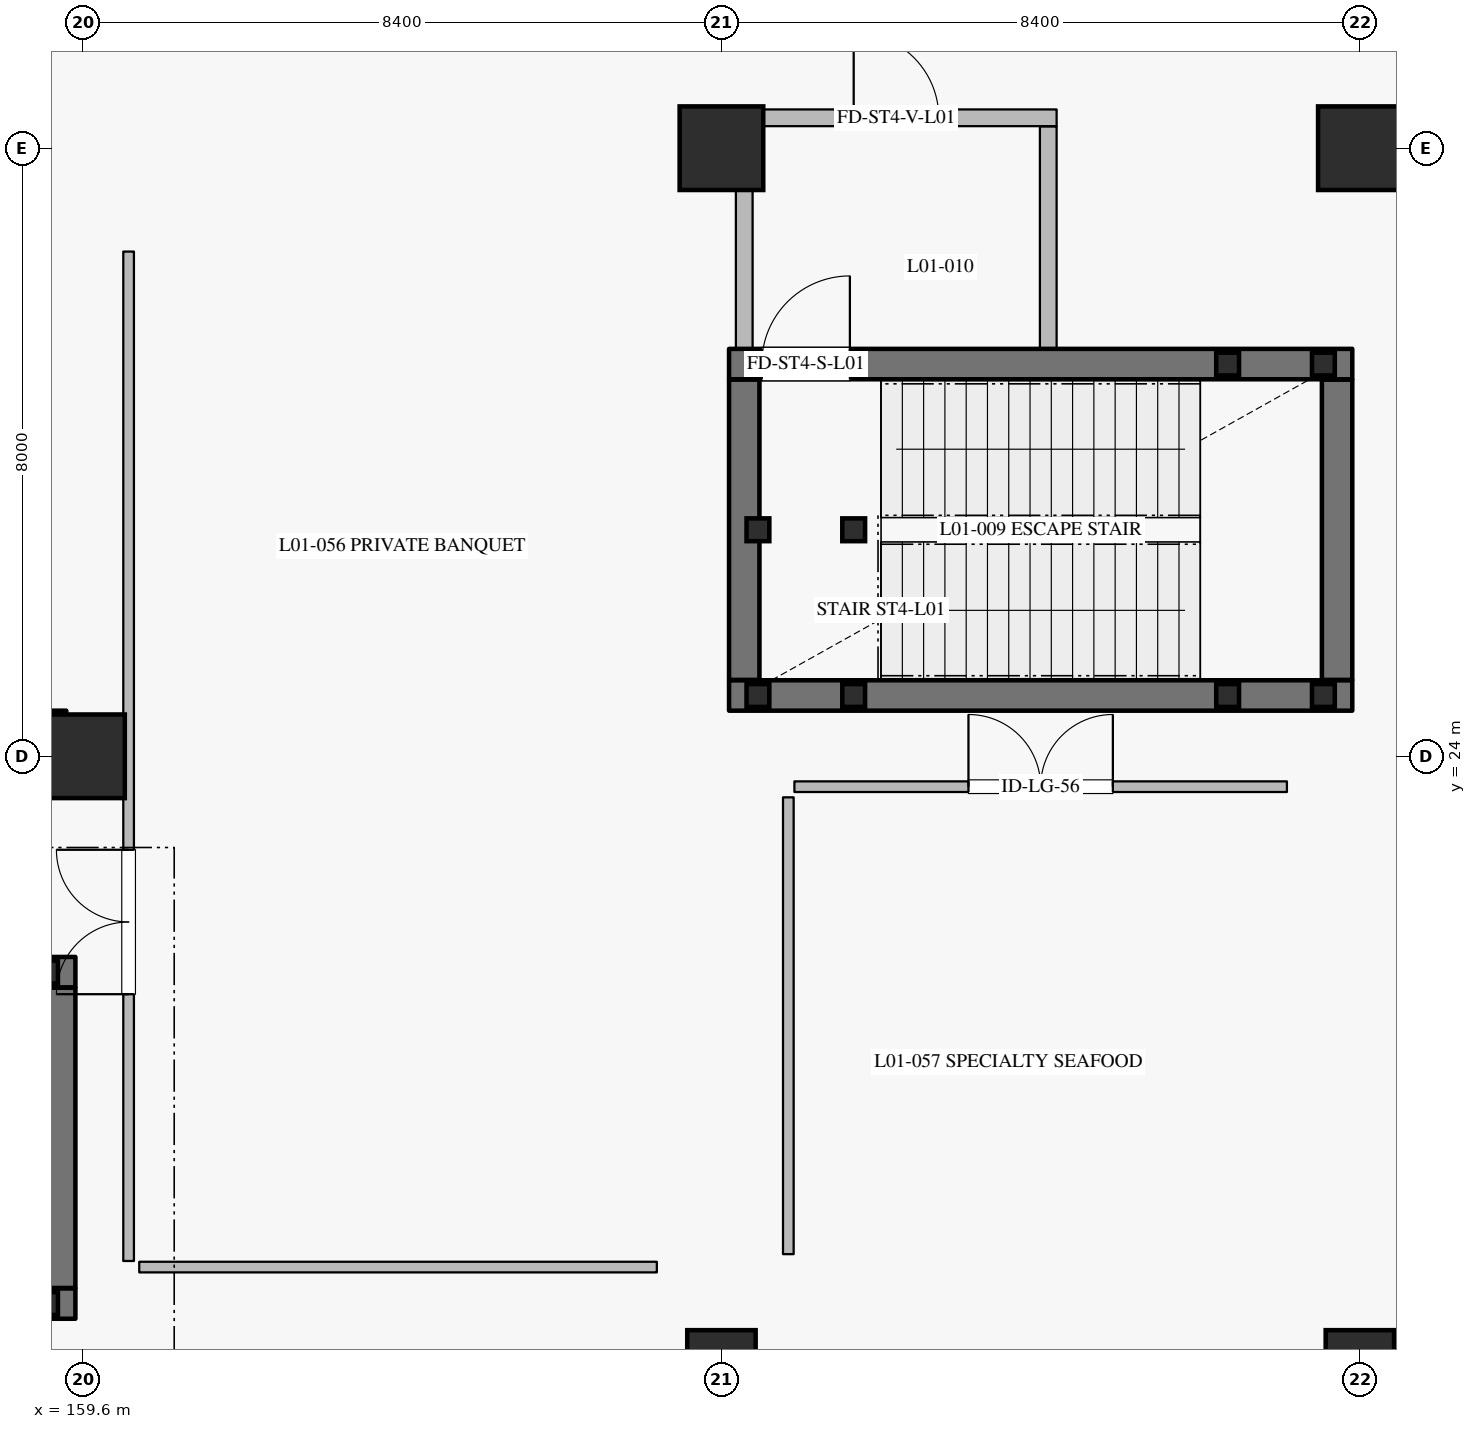
"""IFC4 building model, lengths in metres.
Left out: names, types, materials, properties, quantities, classifications, styles, units other than length and angle.
Written with IfcOpenShell. Run it as: python <this file> out.ifc"""

import sys

from ifc_helpers import new_model, si_unit, direction, frame, frame_2d, origin, origin_2d, place, context, subcontext, project, spatial, rectangle, hollow_rectangle, circle, extrude, element, fill, save


model = new_model("IFC4")
c1 = context("Model", 3, precision=1e-05, world=origin(), true_north=direction((0.0, 1.0)))
c2 = subcontext(c1, "Body", "Model", "MODEL_VIEW")
j1 = project(units=[si_unit("LENGTHUNIT", "METRE"), si_unit("PLANEANGLEUNIT", "RADIAN")], contexts=[c1])
p1 = place(None, origin())
s1 = spatial("IfcSite", under=j1, at=p1, CompositionType="ELEMENT")
p2 = place(p1, origin())
s2 = spatial("IfcBuilding", under=s1, at=p2, CompositionType="ELEMENT")
p3 = place(p2, frame((0.0, 0.0, 6.0)))
s3 = spatial("IfcBuildingStorey", under=s2, at=p3, CompositionType="ELEMENT", Elevation=6.0)
p4 = place(p3, frame((159.6, 24.0, 0.0), z_axis=(0.0, 0.0, 1.0), x_axis=(1.0, 0.0, 0.0)))
e1 = element("IfcColumn", 1, at=p4, inside=s3, PredefinedType="COLUMN", context=c2, shape_type="SweptSolid", body=[
    extrude(circle(Radius=0.55, at=origin_2d()), origin(), (0.0, 0.0, 1.0), 5.4),
])
p5 = place(p3, frame((168.0, 16.0, 0.0), z_axis=(0.0, 0.0, 1.0), x_axis=(1.0, 0.0, 0.0)))
e2 = element("IfcColumn", 2, at=p5, inside=s3, PredefinedType="COLUMN", context=c2, shape_type="SweptSolid", body=[
    extrude(circle(Radius=0.45, at=origin_2d()), origin(), (0.0, 0.0, 1.0), 5.4),
])
p6 = place(p3, frame((168.0, 32.0, 0.0), z_axis=(0.0, 0.0, 1.0), x_axis=(1.0, 0.0, 0.0)))
e3 = element("IfcColumn", 3, at=p6, inside=s3, PredefinedType="COLUMN", context=c2, shape_type="SweptSolid", body=[
    extrude(circle(Radius=0.55, at=origin_2d()), origin(), (0.0, 0.0, 1.0), 5.4),
])
p7 = place(p3, frame((176.4, 16.0, 0.0), z_axis=(0.0, 0.0, 1.0), x_axis=(1.0, 0.0, 0.0)))
e4 = element("IfcColumn", 4, at=p7, inside=s3, PredefinedType="COLUMN", context=c2, shape_type="SweptSolid", body=[
    extrude(circle(Radius=0.45, at=origin_2d()), origin(), (0.0, 0.0, 1.0), 5.4),
])
p8 = place(p3, frame((176.4, 32.0, 0.0), z_axis=(0.0, 0.0, 1.0), x_axis=(1.0, 0.0, 0.0)))
e5 = element("IfcColumn", 5, at=p8, inside=s3, PredefinedType="COLUMN", context=c2, shape_type="SweptSolid", body=[
    extrude(circle(Radius=0.55, at=origin_2d()), origin(), (0.0, 0.0, 1.0), 5.4),
])
p9 = place(p3, frame((159.38, 24.45, 0.0), z_axis=(0.0, 0.0, 1.0), x_axis=(-1.0, 0.0, 0.0)))
e6 = element("IfcWall", 6, at=p9, inside=s3, PredefinedType="SHEAR", context=c2, shape_type="SweptSolid", body=[
    extrude(rectangle(XDim=4.13, YDim=0.3, at=frame_2d((2.065, 0.0))), origin(), (0.0, 0.0, 1.0), 5.045),
])
p10 = place(p9, frame((1.755, 0.0, 0.0)))
e7 = element("IfcOpeningElement", 7, at=p10, cuts=e6, PredefinedType="OPENING", context=c2, shape_type="SweptSolid", body=[
    extrude(rectangle(XDim=1.25, YDim=2.25, at=frame_2d((0.625, 1.125))), frame((0.0, 0.16, 0.0), z_axis=(0.0, -1.0, 0.0), x_axis=(1.0, 0.0, 0.0)), (0.0, 0.0, 1.0), 0.32),
])
p11 = place(p3, frame((151.3, 16.8, 0.0), z_axis=(0.0, 0.0, 1.0), x_axis=(1.0, 0.0, 0.0)))
e8 = element("IfcWall", 8, at=p11, inside=s3, PredefinedType="SHEAR", context=c2, shape_type="SweptSolid", body=[
    extrude(rectangle(XDim=8.2, YDim=0.4, at=frame_2d((4.1, 0.0))), origin(), (0.0, 0.0, 1.0), 5.045),
])
p12 = place(p3, frame((159.3, 17.005, 0.0), z_axis=(0.0, 0.0, 1.0), x_axis=(0.0, 1.0, 0.0)))
e9 = element("IfcWall", 9, at=p12, inside=s3, PredefinedType="SHEAR", context=c2, shape_type="SweptSolid", body=[
    extrude(rectangle(XDim=3.95, YDim=0.4, at=frame_2d((1.975, 0.0))), origin(), (0.0, 0.0, 1.0), 5.045),
])
p13 = place(p3, frame((151.3, 21.16, 0.0), z_axis=(0.0, 0.0, 1.0), x_axis=(1.0, 0.0, 0.0)))
e10 = element("IfcWall", 10, at=p13, inside=s3, PredefinedType="SHEAR", context=c2, shape_type="SweptSolid", body=[
    extrude(rectangle(XDim=8.2, YDim=0.4, at=frame_2d((4.1, 0.0))), origin(), (0.0, 0.0, 1.0), 5.045),
])
p14 = place(p13, frame((0.43, 0.0, 0.0)))
e11 = element("IfcOpeningElement", 11, at=p14, cuts=e10, PredefinedType="OPENING", context=c2, shape_type="SweptSolid", body=[
    extrude(rectangle(XDim=1.16, YDim=2.2, at=frame_2d((0.58, 1.1))), frame((0.0, 0.21, 0.0), z_axis=(0.0, -1.0, 0.0), x_axis=(1.0, 0.0, 0.0)), (0.0, 0.0, 1.0), 0.42),
])
for number, where, z_axis, x_axis in (
    (12, (159.12, 16.8, -3.0), (0.0, 0.0, 1.0), (1.0, 0.0, 0.0)),
    (13, (159.12, 21.16, -3.0), (0.0, 0.0, 1.0), (1.0, 0.0, 0.0)),
):
    element("IfcColumn", number, at=place(p3, frame(where, z_axis=z_axis, x_axis=x_axis)), inside=s3, PredefinedType="COLUMN", context=c2, shape_type="SweptSolid", body=[
        extrude(hollow_rectangle(XDim=0.3, YDim=0.3, WallThickness=0.012, at=origin_2d()), origin(), (0.0, 0.0, 1.0), 5.52),
    ])
p15 = place(p3, frame((168.1, 24.8, 0.0), z_axis=(0.0, 0.0, 1.0), x_axis=(1.0, 0.0, 0.0)))
e14 = element("IfcWall", 14, at=p15, inside=s3, PredefinedType="SHEAR", context=c2, shape_type="SweptSolid", body=[
    extrude(rectangle(XDim=8.2, YDim=0.4, at=frame_2d((4.1, 0.0))), origin(), (0.0, 0.0, 1.0), 5.045),
])
p16 = place(p3, frame((176.1, 25.005, 0.0), z_axis=(0.0, 0.0, 1.0), x_axis=(0.0, 1.0, 0.0)))
e15 = element("IfcWall", 15, at=p16, inside=s3, PredefinedType="SHEAR", context=c2, shape_type="SweptSolid", body=[
    extrude(rectangle(XDim=3.95, YDim=0.4, at=frame_2d((1.975, 0.0))), origin(), (0.0, 0.0, 1.0), 5.045),
])
p17 = place(p3, frame((168.1, 29.16, 0.0), z_axis=(0.0, 0.0, 1.0), x_axis=(1.0, 0.0, 0.0)))
e16 = element("IfcWall", 16, at=p17, inside=s3, PredefinedType="SHEAR", context=c2, shape_type="SweptSolid", body=[
    extrude(rectangle(XDim=8.2, YDim=0.4, at=frame_2d((4.1, 0.0))), origin(), (0.0, 0.0, 1.0), 5.045),
])
p18 = place(p17, frame((0.43, 0.0, 0.0)))
e17 = element("IfcOpeningElement", 17, at=p18, cuts=e16, PredefinedType="OPENING", context=c2, shape_type="SweptSolid", body=[
    extrude(rectangle(XDim=1.16, YDim=2.2, at=frame_2d((0.58, 1.1))), frame((0.0, 0.21, 0.0), z_axis=(0.0, -1.0, 0.0), x_axis=(1.0, 0.0, 0.0)), (0.0, 0.0, 1.0), 0.42),
])
p19 = place(p3, frame((168.3, 25.005, 0.0), z_axis=(0.0, 0.0, 1.0), x_axis=(0.0, 1.0, 0.0)))
e18 = element("IfcWall", 18, at=p19, inside=s3, PredefinedType="SHEAR", context=c2, shape_type="SweptSolid", body=[
    extrude(rectangle(XDim=3.95, YDim=0.4, at=frame_2d((1.975, 0.0))), origin(), (0.0, 0.0, 1.0), 5.045),
])
p20 = place(p3, frame((168.3, 29.365, 0.0), z_axis=(0.0, 0.0, 1.0), x_axis=(0.0, 1.0, 0.0)))
e19 = element("IfcWall", 19, at=p20, inside=s3, PredefinedType="PARTITIONING", context=c2, shape_type="SweptSolid", body=[
    extrude(rectangle(XDim=2.92, YDim=0.22, at=frame_2d((1.46, 0.0))), origin(), (0.0, 0.0, 1.0), 3.45),
])
p21 = place(p3, frame((168.19, 32.4, 0.0), z_axis=(0.0, 0.0, 1.0), x_axis=(1.0, 0.0, 0.0)))
e20 = element("IfcWall", 20, at=p21, inside=s3, PredefinedType="PARTITIONING", context=c2, shape_type="SweptSolid", body=[
    extrude(rectangle(XDim=4.22, YDim=0.22, at=frame_2d((2.11, 0.0))), origin(), (0.0, 0.0, 1.0), 5.045),
])
p22 = place(p21, frame((1.55, 0.0, 0.0)))
e21 = element("IfcOpeningElement", 21, at=p22, cuts=e20, PredefinedType="OPENING", context=c2, shape_type="SweptSolid", body=[
    extrude(rectangle(XDim=1.12, YDim=2.2, at=frame_2d((0.56, 1.1))), frame((0.0, 0.12, 0.0), z_axis=(0.0, -1.0, 0.0), x_axis=(1.0, 0.0, 0.0)), (0.0, 0.0, 1.0), 0.24),
])
p23 = place(p3, frame((172.3, 29.365, 0.0), z_axis=(0.0, 0.0, 1.0), x_axis=(0.0, 1.0, 0.0)))
e22 = element("IfcWall", 22, at=p23, inside=s3, PredefinedType="PARTITIONING", context=c2, shape_type="SweptSolid", body=[
    extrude(rectangle(XDim=2.92, YDim=0.22, at=frame_2d((1.46, 0.0))), origin(), (0.0, 0.0, 1.0), 5.045),
])
for number, where, z_axis, x_axis in (
    (23, (168.48, 24.8, 0.0), (0.0, 0.0, 1.0), (1.0, 0.0, 0.0)),
    (24, (168.48, 26.98, 0.0), (0.0, 0.0, 1.0), (1.0, 0.0, 0.0)),
    (25, (169.74, 24.8, 0.0), (0.0, 0.0, 1.0), (1.0, 0.0, 0.0)),
    (26, (169.74, 26.98, 0.0), (0.0, 0.0, 1.0), (1.0, 0.0, 0.0)),
):
    element("IfcColumn", number, at=place(p3, frame(where, z_axis=z_axis, x_axis=x_axis)), inside=s3, PredefinedType="COLUMN", context=c2, shape_type="SweptSolid", body=[
        extrude(hollow_rectangle(XDim=0.3, YDim=0.3, WallThickness=0.012, at=origin_2d()), origin(), (0.0, 0.0, 1.0), 5.22),
    ])
for number, where, z_axis, x_axis in (
    (27, (174.66, 24.8, -3.0), (0.0, 0.0, 1.0), (1.0, 0.0, 0.0)),
    (28, (174.66, 29.16, -3.0), (0.0, 0.0, 1.0), (1.0, 0.0, 0.0)),
    (29, (175.92, 24.8, -3.0), (0.0, 0.0, 1.0), (1.0, 0.0, 0.0)),
    (30, (175.92, 29.16, -3.0), (0.0, 0.0, 1.0), (1.0, 0.0, 0.0)),
):
    element("IfcColumn", number, at=place(p3, frame(where, z_axis=z_axis, x_axis=x_axis)), inside=s3, PredefinedType="COLUMN", context=c2, shape_type="SweptSolid", body=[
        extrude(hollow_rectangle(XDim=0.3, YDim=0.3, WallThickness=0.012, at=origin_2d()), origin(), (0.0, 0.0, 1.0), 5.52),
    ])
p24 = place(p3, frame((160.2, 17.36, 0.0), z_axis=(0.0, 0.0, 1.0), x_axis=(0.0, 1.0, 0.0)))
e31 = element("IfcWall", 31, at=p24, inside=s3, PredefinedType="PARTITIONING", context=c2, shape_type="SweptSolid", body=[
    extrude(rectangle(XDim=13.28, YDim=0.14, at=frame_2d((6.64, 0.0))), origin(), (0.0, 0.0, 1.0), 5.045),
])
p25 = place(p24, frame((3.51, 0.0, 0.0)))
e32 = element("IfcOpeningElement", 32, at=p25, cuts=e31, PredefinedType="OPENING", context=c2, shape_type="SweptSolid", body=[
    extrude(rectangle(XDim=1.9, YDim=2.4, at=frame_2d((0.95, 1.2))), frame((0.0, 0.08, 0.0), z_axis=(0.0, -1.0, 0.0), x_axis=(1.0, 0.0, 0.0)), (0.0, 0.0, 1.0), 0.16),
])
p26 = place(p3, frame((160.34, 17.28, 0.0), z_axis=(0.0, 0.0, 1.0), x_axis=(1.0, 0.0, 0.0)))
e33 = element("IfcWall", 33, at=p26, inside=s3, PredefinedType="PARTITIONING", context=c2, shape_type="SweptSolid", body=[
    extrude(rectangle(XDim=6.81, YDim=0.14, at=frame_2d((3.405, 0.0))), origin(), (0.0, 0.0, 1.0), 5.045),
])
p27 = place(p3, frame((168.96, 23.6, 0.0), z_axis=(0.0, 0.0, 1.0), x_axis=(1.0, 0.0, 0.0)))
e34 = element("IfcWall", 34, at=p27, inside=s3, PredefinedType="PARTITIONING", context=c2, shape_type="SweptSolid", body=[
    extrude(rectangle(XDim=6.48, YDim=0.14, at=frame_2d((3.24, 0.0))), origin(), (0.0, 0.0, 1.0), 5.045),
])
p28 = place(p27, frame((2.29, 0.0, 0.0)))
e35 = element("IfcOpeningElement", 35, at=p28, cuts=e34, PredefinedType="OPENING", context=c2, shape_type="SweptSolid", body=[
    extrude(rectangle(XDim=1.9, YDim=2.4, at=frame_2d((0.95, 1.2))), frame((0.0, 0.08, 0.0), z_axis=(0.0, -1.0, 0.0), x_axis=(1.0, 0.0, 0.0)), (0.0, 0.0, 1.0), 0.16),
])
p29 = place(p3, frame((168.88, 17.45, 0.0), z_axis=(0.0, 0.0, 1.0), x_axis=(0.0, 1.0, 0.0)))
e36 = element("IfcWall", 36, at=p29, inside=s3, PredefinedType="PARTITIONING", context=c2, shape_type="SweptSolid", body=[
    extrude(rectangle(XDim=6.01, YDim=0.14, at=frame_2d((3.005, 0.0))), origin(), (0.0, 0.0, 1.0), 5.045),
])
p30 = place(p18, origin())
e37 = element("IfcDoor", 37, at=p30, inside=s3, OperationType="SINGLE_SWING_RIGHT", PredefinedType="DOOR", context=c2, shape_type="SweptSolid", body=[
    extrude(rectangle(XDim=1.16, YDim=2.2, at=frame_2d((0.58, 1.1))), frame((0.0, 0.025, 0.0), z_axis=(0.0, -1.0, 0.0), x_axis=(1.0, 0.0, 0.0)), (0.0, 0.0, 1.0), 0.05),
])
fill(e17, e37)
p31 = place(p22, origin())
e38 = element("IfcDoor", 38, at=p31, inside=s3, OperationType="SINGLE_SWING_LEFT", PredefinedType="DOOR", context=c2, shape_type="SweptSolid", body=[
    extrude(rectangle(XDim=1.12, YDim=2.2, at=frame_2d((0.56, 1.1))), frame((0.0, 0.025, 0.0), z_axis=(0.0, -1.0, 0.0), x_axis=(1.0, 0.0, 0.0)), (0.0, 0.0, 1.0), 0.05),
])
fill(e21, e38)
p32 = place(p25, origin())
e39 = element("IfcDoor", 39, at=p32, inside=s3, OperationType="DOUBLE_DOOR_SINGLE_SWING", PredefinedType="DOOR", context=c2, shape_type="SweptSolid", body=[
    extrude(rectangle(XDim=1.9, YDim=2.4, at=frame_2d((0.95, 1.2))), frame((0.0, 0.025, 0.0), z_axis=(0.0, -1.0, 0.0), x_axis=(1.0, 0.0, 0.0)), (0.0, 0.0, 1.0), 0.05),
])
fill(e32, e39)
p33 = place(p28, origin())
e40 = element("IfcDoor", 40, at=p33, inside=s3, OperationType="DOUBLE_DOOR_SINGLE_SWING", PredefinedType="DOOR", context=c2, shape_type="SweptSolid", body=[
    extrude(rectangle(XDim=1.9, YDim=2.4, at=frame_2d((0.95, 1.2))), frame((0.0, 0.025, 0.0), z_axis=(0.0, -1.0, 0.0), x_axis=(1.0, 0.0, 0.0)), (0.0, 0.0, 1.0), 0.05),
])
fill(e35, e40)
save(model, sys.argv[1])
